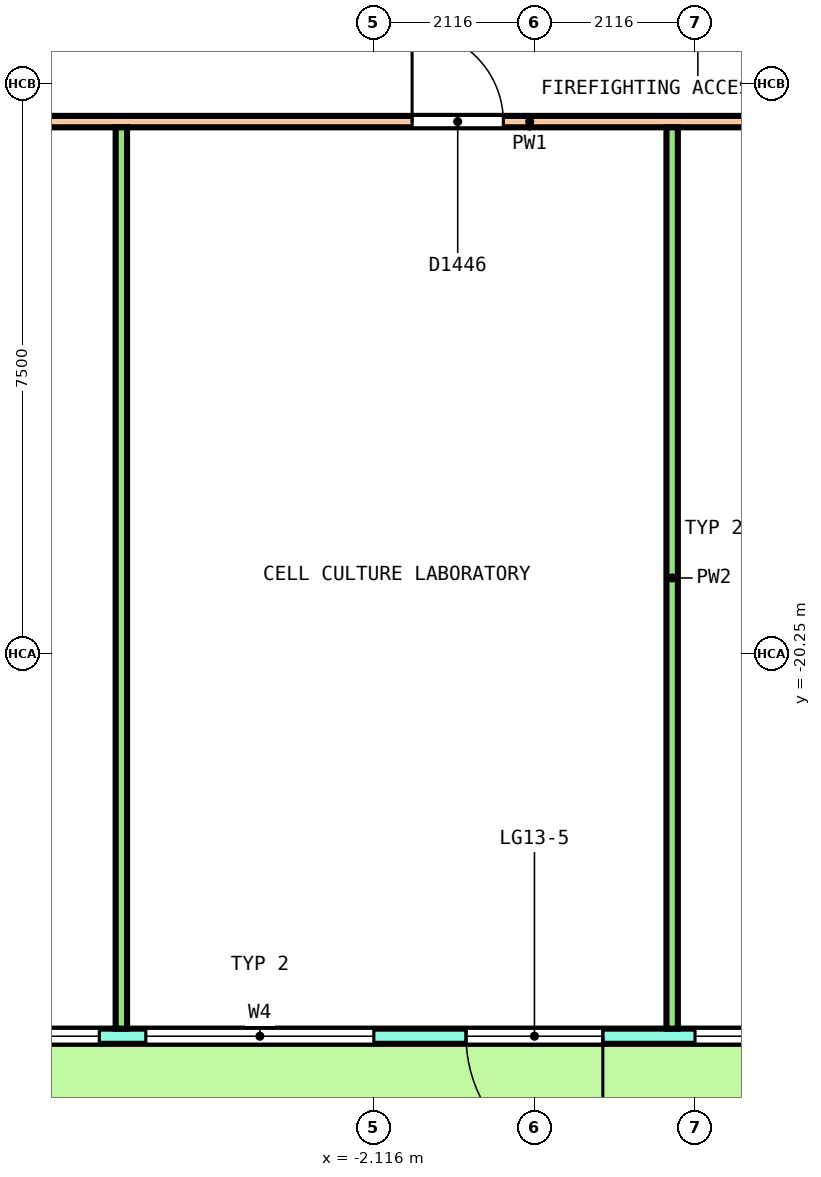
"""IFC4 building model, lengths in metres.
Left out: names, types, materials, properties, quantities, classifications, styles, units other than length and angle.
Written with IfcOpenShell. Run it as: python <this file> out.ifc"""

import sys

from ifc_helpers import new_model, si_unit, direction, frame, frame_2d, origin, place, context, subcontext, project, spatial, polyline, rectangle, outline, extrude, element, fill, save


model = new_model("IFC4")
c1 = context("Model", 3, precision=1e-05, world=origin(), true_north=direction((0.0, 1.0)))
c2 = subcontext(c1, "Body", "Model", "MODEL_VIEW")
j1 = project(units=[si_unit("LENGTHUNIT", "METRE"), si_unit("PLANEANGLEUNIT", "RADIAN")], contexts=[c1])
p1 = place(None, origin())
s1 = spatial("IfcSite", under=j1, at=p1, CompositionType="ELEMENT")
p2 = place(p1, origin())
s2 = spatial("IfcBuilding", under=s1, at=p2, CompositionType="ELEMENT")
p3 = place(p2, frame((0.0, 0.0, 58.6)))
s3 = spatial("IfcBuildingStorey", under=s2, at=p3, CompositionType="ELEMENT", Elevation=58.6)
p4 = place(p3, frame((-9.031, -25.283, 0.0), z_axis=(0.0, 0.0, 1.0), x_axis=(1.0, 0.0, 0.0)))
e1 = element("IfcWall", 1, at=p4, inside=s3, PredefinedType="SOLIDWALL", context=c2, shape_type="SweptSolid", body=[
    extrude(outline(polyline([(-0.027, -0.1), (0.979, -0.1), (1.986, -0.1), (2.992, -0.1), (3.999, -0.1), (5.005, -0.1), (6.012, -0.1), (7.018, -0.1), (8.025, -0.1), (9.031, -0.1), (10.038, -0.1), (11.044, -0.1), (12.051, -0.1), (13.057, -0.1), (14.063, -0.1), (15.07, -0.1), (16.076, -0.1), (17.083, -0.1), (18.089, -0.1), (18.036, 0.1), (17.035, 0.1), (16.035, 0.1), (15.034, 0.1), (14.034, 0.1), (13.033, 0.1), (12.033, 0.1), (11.032, 0.1), (10.032, 0.1), (9.031, 0.1), (8.031, 0.1), (7.03, 0.1), (6.03, 0.1), (5.029, 0.1), (4.029, 0.1), (3.028, 0.1), (2.028, 0.1), (1.027, 0.1), (0.027, 0.1), (-0.027, -0.1)])), origin(), (0.0, 0.0, 1.0), 4.1),
])
p5 = place(p4, frame((0.306, 0.0, 0.1)))
e2 = element("IfcOpeningElement", 2, at=p5, cuts=e1, PredefinedType="OPENING", context=c2, shape_type="SweptSolid", body=[
    extrude(rectangle(XDim=3.0, YDim=2.9, at=frame_2d((1.5, 1.45))), frame((0.0, 0.11, 0.0), z_axis=(0.0, -1.0, 0.0), x_axis=(1.0, 0.0, 0.0)), (0.0, 0.0, 1.0), 0.22),
])
p6 = place(p4, frame((3.919, 0.0, 0.1)))
e3 = element("IfcOpeningElement", 3, at=p6, cuts=e1, PredefinedType="OPENING", context=c2, shape_type="SweptSolid", body=[
    extrude(rectangle(XDim=3.0, YDim=2.9, at=frame_2d((1.5, 1.45))), frame((0.0, 0.11, 0.0), z_axis=(0.0, -1.0, 0.0), x_axis=(1.0, 0.0, 0.0)), (0.0, 0.0, 1.0), 0.22),
])
p7 = place(p4, frame((8.131, 0.0, 0.0)))
e4 = element("IfcOpeningElement", 4, at=p7, cuts=e1, PredefinedType="OPENING", context=c2, shape_type="SweptSolid", body=[
    extrude(rectangle(XDim=1.8, YDim=2.4, at=frame_2d((0.9, 1.2))), frame((0.0, 0.11, 0.0), z_axis=(0.0, -1.0, 0.0), x_axis=(1.0, 0.0, 0.0)), (0.0, 0.0, 1.0), 0.22),
])
p8 = place(p4, frame((8.131, 0.0, 2.55)))
e5 = element("IfcOpeningElement", 5, at=p8, cuts=e1, PredefinedType="OPENING", context=c2, shape_type="SweptSolid", body=[
    extrude(rectangle(XDim=1.8, YDim=0.45, at=frame_2d((0.9, 0.225))), frame((0.0, 0.11, 0.0), z_axis=(0.0, -1.0, 0.0), x_axis=(1.0, 0.0, 0.0)), (0.0, 0.0, 1.0), 0.22),
])
p9 = place(p4, frame((11.144, 0.0, 0.1)))
e6 = element("IfcOpeningElement", 6, at=p9, cuts=e1, PredefinedType="OPENING", context=c2, shape_type="SweptSolid", body=[
    extrude(rectangle(XDim=3.0, YDim=2.9, at=frame_2d((1.5, 1.45))), frame((0.0, 0.11, 0.0), z_axis=(0.0, -1.0, 0.0), x_axis=(1.0, 0.0, 0.0)), (0.0, 0.0, 1.0), 0.22),
])
p10 = place(p4, frame((14.756, 0.0, 0.1)))
e7 = element("IfcOpeningElement", 7, at=p10, cuts=e1, PredefinedType="OPENING", context=c2, shape_type="SweptSolid", body=[
    extrude(rectangle(XDim=3.0, YDim=2.9, at=frame_2d((1.5, 1.45))), frame((0.0, 0.11, 0.0), z_axis=(0.0, -1.0, 0.0), x_axis=(1.0, 0.0, 0.0)), (0.0, 0.0, 1.0), 0.22),
])
p11 = place(p3, frame((-15.725, -13.25, 0.0), z_axis=(0.0, 0.0, 1.0), x_axis=(1.0, 0.0, 0.0)))
e8 = element("IfcWall", 8, at=p11, inside=s3, PredefinedType="PARTITIONING", context=c2, shape_type="SweptSolid", body=[
    extrude(rectangle(XDim=31.325, YDim=0.15, at=frame_2d((15.663, 0.0))), origin(), (0.0, 0.0, 1.0), 3.05),
])
p12 = place(p11, frame((0.898, 0.0, 0.0)))
e9 = element("IfcOpeningElement", 9, at=p12, cuts=e8, PredefinedType="OPENING", context=c2, shape_type="SweptSolid", body=[
    extrude(rectangle(XDim=1.0, YDim=2.1, at=frame_2d((0.5, 1.05))), frame((0.0, 0.085, 0.0), z_axis=(0.0, -1.0, 0.0), x_axis=(1.0, 0.0, 0.0)), (0.0, 0.0, 1.0), 0.17),
])
p13 = place(p11, frame((5.198, 0.0, 0.0)))
e10 = element("IfcOpeningElement", 10, at=p13, cuts=e8, PredefinedType="OPENING", context=c2, shape_type="SweptSolid", body=[
    extrude(rectangle(XDim=1.2, YDim=2.1, at=frame_2d((0.6, 1.05))), frame((0.0, 0.085, 0.0), z_axis=(0.0, -1.0, 0.0), x_axis=(1.0, 0.0, 0.0)), (0.0, 0.0, 1.0), 0.17),
])
p14 = place(p11, frame((14.115, 0.0, 0.0)))
e11 = element("IfcOpeningElement", 11, at=p14, cuts=e8, PredefinedType="OPENING", context=c2, shape_type="SweptSolid", body=[
    extrude(rectangle(XDim=1.2, YDim=2.1, at=frame_2d((0.6, 1.05))), frame((0.0, 0.085, 0.0), z_axis=(0.0, -1.0, 0.0), x_axis=(1.0, 0.0, 0.0)), (0.0, 0.0, 1.0), 0.17),
])
p15 = place(p11, frame((22.046, 0.0, 0.0)))
e12 = element("IfcOpeningElement", 12, at=p15, cuts=e8, PredefinedType="OPENING", context=c2, shape_type="SweptSolid", body=[
    extrude(rectangle(XDim=1.0, YDim=2.1, at=frame_2d((0.5, 1.05))), frame((0.0, 0.085, 0.0), z_axis=(0.0, -1.0, 0.0), x_axis=(1.0, 0.0, 0.0)), (0.0, 0.0, 1.0), 0.17),
])
p16 = place(p11, frame((28.358, 0.0, 0.0)))
e13 = element("IfcOpeningElement", 13, at=p16, cuts=e8, PredefinedType="OPENING", context=c2, shape_type="SweptSolid", body=[
    extrude(rectangle(XDim=1.0, YDim=2.1, at=frame_2d((0.5, 1.05))), frame((0.0, 0.085, 0.0), z_axis=(0.0, -1.0, 0.0), x_axis=(1.0, 0.0, 0.0)), (0.0, 0.0, 1.0), 0.17),
])
for number, where, z_axis, x_axis in (
    (14, (-5.435, -25.183, 0.0), (0.0, 0.0, 1.0), (0.0, 1.0, 0.0)),
    (15, (1.812, -25.183, 0.0), (0.0, 0.0, 1.0), (0.0, 1.0, 0.0)),
):
    element("IfcWall", number, at=place(p3, frame(where, z_axis=z_axis, x_axis=x_axis)), inside=s3, PredefinedType="PARTITIONING", context=c2, shape_type="SweptSolid", body=[
        extrude(rectangle(XDim=11.858, YDim=0.15, at=frame_2d((5.929, 0.0))), origin(), (0.0, 0.0, 1.0), 3.05),
    ])
p17 = place(p5, origin())
e16 = element("IfcWindow", 16, at=p17, inside=s3, PartitioningType="SINGLE_PANEL", PredefinedType="WINDOW", context=c2, shape_type="SweptSolid", body=[
    extrude(rectangle(XDim=3.0, YDim=2.9, at=frame_2d((1.5, 1.45))), frame((0.0, 0.03, 0.0), z_axis=(0.0, -1.0, 0.0), x_axis=(1.0, 0.0, 0.0)), (0.0, 0.0, 1.0), 0.06),
])
fill(e2, e16)
p18 = place(p6, origin())
e17 = element("IfcWindow", 17, at=p18, inside=s3, PartitioningType="SINGLE_PANEL", PredefinedType="WINDOW", context=c2, shape_type="SweptSolid", body=[
    extrude(rectangle(XDim=3.0, YDim=2.9, at=frame_2d((1.5, 1.45))), frame((0.0, 0.03, 0.0), z_axis=(0.0, -1.0, 0.0), x_axis=(1.0, 0.0, 0.0)), (0.0, 0.0, 1.0), 0.06),
])
fill(e3, e17)
p19 = place(p7, origin())
e18 = element("IfcDoor", 18, at=p19, inside=s3, OperationType="DOUBLE_DOOR_SINGLE_SWING", PredefinedType="DOOR", context=c2, shape_type="SweptSolid", body=[
    extrude(rectangle(XDim=1.8, YDim=2.4, at=frame_2d((0.9, 1.2))), frame((0.0, 0.025, 0.0), z_axis=(0.0, -1.0, 0.0), x_axis=(1.0, 0.0, 0.0)), (0.0, 0.0, 1.0), 0.05),
])
fill(e4, e18)
p20 = place(p8, origin())
e19 = element("IfcWindow", 19, at=p20, inside=s3, PartitioningType="SINGLE_PANEL", PredefinedType="WINDOW", context=c2, shape_type="SweptSolid", body=[
    extrude(rectangle(XDim=1.8, YDim=0.45, at=frame_2d((0.9, 0.225))), frame((0.0, 0.03, 0.0), z_axis=(0.0, -1.0, 0.0), x_axis=(1.0, 0.0, 0.0)), (0.0, 0.0, 1.0), 0.06),
])
fill(e5, e19)
p21 = place(p9, origin())
e20 = element("IfcWindow", 20, at=p21, inside=s3, PartitioningType="SINGLE_PANEL", PredefinedType="WINDOW", context=c2, shape_type="SweptSolid", body=[
    extrude(rectangle(XDim=3.0, YDim=2.9, at=frame_2d((1.5, 1.45))), frame((0.0, 0.03, 0.0), z_axis=(0.0, -1.0, 0.0), x_axis=(1.0, 0.0, 0.0)), (0.0, 0.0, 1.0), 0.06),
])
fill(e6, e20)
p22 = place(p14, origin())
e21 = element("IfcDoor", 21, at=p22, inside=s3, OperationType="DOUBLE_DOOR_SINGLE_SWING", PredefinedType="DOOR", context=c2, shape_type="SweptSolid", body=[
    extrude(rectangle(XDim=1.2, YDim=2.1, at=frame_2d((0.6, 1.05))), frame((0.0, 0.025, 0.0), z_axis=(0.0, -1.0, 0.0), x_axis=(1.0, 0.0, 0.0)), (0.0, 0.0, 1.0), 0.05),
])
fill(e11, e21)
save(model, sys.argv[1])
